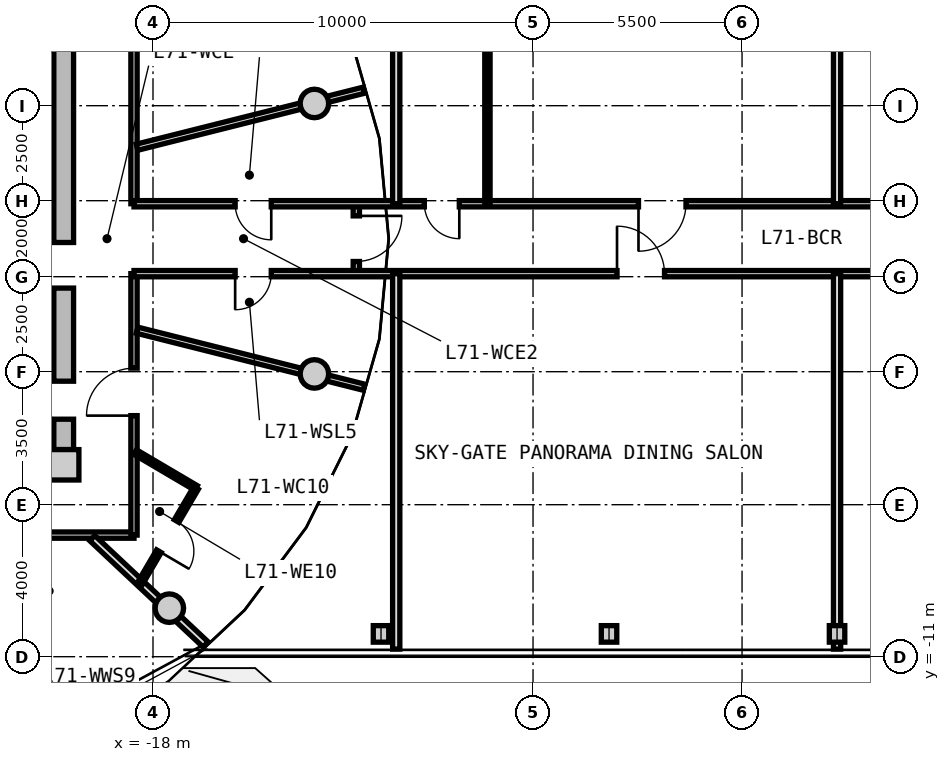
"""IFC4 building model, lengths in metres.
Left out: names, types, materials, properties, quantities, classifications, styles, units other than length and angle.
Written with IfcOpenShell. Run it as: python <this file> out.ifc"""

import sys

from ifc_helpers import new_model, si_unit, direction, frame, frame_2d, origin, origin_2d, place, context, subcontext, project, spatial, rectangle, circle, i_section, extrude, source, transform, mapped, element, fill, save


model = new_model("IFC4")
c1 = context("Model", 3, precision=1e-05, world=origin(), true_north=direction((0.0, 1.0)))
c2 = subcontext(c1, "Body", "Model", "MODEL_VIEW")
j1 = project(units=[si_unit("LENGTHUNIT", "METRE"), si_unit("PLANEANGLEUNIT", "RADIAN")], contexts=[c1])
p1 = place(None, origin())
s1 = spatial("IfcSite", under=j1, at=p1, CompositionType="ELEMENT")
p2 = place(p1, origin())
s2 = spatial("IfcBuilding", under=s1, at=p2, CompositionType="ELEMENT")
p3 = place(p2, frame((0.0, 0.0, 229.15)))
s3 = spatial("IfcBuildingStorey", under=s2, at=p3, CompositionType="ELEMENT", Elevation=229.15)
m1 = source(origin(), c2, "Body", "SweptSolid", [
    extrude(rectangle(XDim=0.8, YDim=0.8, at=origin_2d()), origin(), (0.0, 0.0, 1.0), 3.05),
])
p4 = place(p3, frame((-20.35, -5.95, 0.0), z_axis=(0.0, 0.0, 1.0), x_axis=(1.0, 0.0, 0.0)))
e1 = element("IfcColumn", 1, at=p4, inside=s3, PredefinedType="COLUMN", context=c2, shape_type="MappedRepresentation", body=[
    mapped(m1, transform((0.0, 0.0, 0.0), x_axis=(1.0, 0.0, 0.0), y_axis=(0.0, 1.0, 0.0), z_axis=(0.0, 0.0, 1.0), scale=1.0)),
])
m2 = source(origin(), c2, "Body", "SweptSolid", [
    extrude(rectangle(XDim=11.1, YDim=0.52, at=frame_2d((5.55, 0.0))), origin(), (0.0, 0.0, 1.0), 2.81),
])
p5 = place(p3, frame((-20.35, 5.55, 0.0), z_axis=(0.0, 0.0, 1.0), x_axis=(0.0, -1.0, 0.0)))
e2 = element("IfcWall", 2, at=p5, inside=s3, PredefinedType="SHEAR", context=c2, shape_type="MappedRepresentation", body=[
    mapped(m2, transform((0.0, 0.0, 0.0), x_axis=(1.0, 0.0, 0.0), y_axis=(0.0, 1.0, 0.0), z_axis=(0.0, 0.0, 1.0), scale=1.0)),
])
p6 = place(p5, frame((5.65, 0.0, 0.0)))
e3 = element("IfcOpeningElement", 3, at=p6, cuts=e2, PredefinedType="OPENING", context=c2, shape_type="SweptSolid", body=[
    extrude(rectangle(XDim=1.2, YDim=2.15, at=frame_2d((0.6, 1.075))), frame((0.0, 0.27, 0.0), z_axis=(0.0, -1.0, 0.0), x_axis=(1.0, 0.0, 0.0)), (0.0, 0.0, 1.0), 0.54),
])
p7 = place(p5, frame((9.3, 0.0, 0.0)))
e4 = element("IfcOpeningElement", 4, at=p7, cuts=e2, PredefinedType="OPENING", context=c2, shape_type="SweptSolid", body=[
    extrude(rectangle(XDim=1.0, YDim=2.1, at=frame_2d((0.5, 1.05))), frame((0.0, 0.27, 0.0), z_axis=(0.0, -1.0, 0.0), x_axis=(1.0, 0.0, 0.0)), (0.0, 0.0, 1.0), 0.54),
])
m3 = source(origin(), c2, "Body", "SweptSolid", [
    extrude(circle(Radius=0.375, at=origin_2d()), origin(), (0.0, 0.0, 1.0), 3.05),
])
for number, where, z_axis, x_axis in (
    (5, (-13.753, 3.559, 0.0), (0.0, 0.0, 1.0), (1.0, 0.0, 0.0)),
    (6, (-17.57, -9.723, 0.0), (0.0, 0.0, 1.0), (1.0, 0.0, 0.0)),
    (7, (-13.753, -3.559, 0.0), (0.0, 0.0, 1.0), (1.0, 0.0, 0.0)),
):
    element("IfcColumn", number, at=place(p3, frame(where, z_axis=z_axis, x_axis=x_axis)), inside=s3, PredefinedType="COLUMN", context=c2, shape_type="MappedRepresentation", body=[
        mapped(m3, transform((0.0, 0.0, 0.0), x_axis=(1.0, 0.0, 0.0), y_axis=(0.0, 1.0, 0.0), z_axis=(0.0, 0.0, 1.0), scale=1.0)),
    ])
m4 = source(origin(), c2, "Body", "SweptSolid", [
    extrude(i_section(OverallWidth=0.407, OverallDepth=0.435, WebThickness=0.024, FlangeThickness=0.039, FilletRadius=0.015, at=origin_2d()), origin(), (0.0, 0.0, 1.0), 3.05),
])
for number, where, z_axis, x_axis in (
    (8, (-12.0, -10.4, 0.0), (0.0, 0.0, 1.0), (1.0, 0.0, 0.0)),
    (9, (-6.0, -10.4, 0.0), (0.0, 0.0, 1.0), (1.0, 0.0, 0.0)),
    (10, (0.0, -10.4, 0.0), (0.0, 0.0, 1.0), (1.0, 0.0, 0.0)),
):
    element("IfcColumn", number, at=place(p3, frame(where, z_axis=z_axis, x_axis=x_axis)), inside=s3, PredefinedType="COLUMN", context=c2, shape_type="MappedRepresentation", body=[
        mapped(m4, transform((0.0, 0.0, 0.0), x_axis=(1.0, 0.0, 0.0), y_axis=(0.0, 1.0, 0.0), z_axis=(0.0, 0.0, 1.0), scale=1.0)),
    ])
m5 = source(origin(), c2, "Body", "SweptSolid", [
    extrude(rectangle(XDim=19.0, YDim=0.165, at=frame_2d((9.5, 0.0))), origin(), (0.0, 0.0, 1.0), 2.795),
])
p8 = place(p3, frame((-18.5, -7.8, 0.0), z_axis=(0.0, 0.0, 1.0), x_axis=(-1.0, 0.0, 0.0)))
e11 = element("IfcWall", 11, at=p8, inside=s3, PredefinedType="PARTITIONING", context=c2, shape_type="MappedRepresentation", body=[
    mapped(m5, transform((0.0, 0.0, 0.0), x_axis=(1.0, 0.0, 0.0), y_axis=(0.0, 1.0, 0.0), z_axis=(0.0, 0.0, 1.0), scale=1.0)),
])
p9 = place(p8, frame((12.373, 0.0, 0.0)))
e12 = element("IfcOpeningElement", 12, at=p9, cuts=e11, PredefinedType="OPENING", context=c2, shape_type="SweptSolid", body=[
    extrude(rectangle(XDim=1.25, YDim=2.2, at=frame_2d((0.625, 1.1))), frame((0.0, 0.093, 0.0), z_axis=(0.0, -1.0, 0.0), x_axis=(1.0, 0.0, 0.0)), (0.0, 0.0, 1.0), 0.185),
])
p10 = place(p8, frame((5.946, 0.0, 0.0)))
e13 = element("IfcOpeningElement", 13, at=p10, cuts=e11, PredefinedType="OPENING", context=c2, shape_type="SweptSolid", body=[
    extrude(rectangle(XDim=0.92, YDim=2.1, at=frame_2d((0.46, 1.05))), frame((0.0, 0.093, 0.0), z_axis=(0.0, -1.0, 0.0), x_axis=(1.0, 0.0, 0.0)), (0.0, 0.0, 1.0), 0.185),
])
p11 = place(p8, frame((2.83, 0.0, 0.0)))
e14 = element("IfcOpeningElement", 14, at=p11, cuts=e11, PredefinedType="OPENING", context=c2, shape_type="SweptSolid", body=[
    extrude(rectangle(XDim=0.92, YDim=2.1, at=frame_2d((0.46, 1.05))), frame((0.0, 0.093, 0.0), z_axis=(0.0, -1.0, 0.0), x_axis=(1.0, 0.0, 0.0)), (0.0, 0.0, 1.0), 0.185),
])
m6 = source(origin(), c2, "Body", "SweptSolid", [
    extrude(rectangle(XDim=6.88, YDim=0.165, at=frame_2d((3.44, 0.0))), origin(), (0.0, 0.0, 1.0), 2.795),
])
p12 = place(p3, frame((-18.5, 7.8, 0.0), z_axis=(0.0, 0.0, 1.0), x_axis=(0.0, -1.0, 0.0)))
e15 = element("IfcWall", 15, at=p12, inside=s3, PredefinedType="PARTITIONING", context=c2, shape_type="MappedRepresentation", body=[
    mapped(m6, transform((0.0, 0.0, 0.0), x_axis=(1.0, 0.0, 0.0), y_axis=(0.0, 1.0, 0.0), z_axis=(0.0, 0.0, 1.0), scale=1.0)),
])
p13 = place(p3, frame((-18.5, -0.92, 0.0), z_axis=(0.0, 0.0, 1.0), x_axis=(0.0, -1.0, 0.0)))
e16 = element("IfcWall", 16, at=p13, inside=s3, PredefinedType="PARTITIONING", context=c2, shape_type="MappedRepresentation", body=[
    mapped(m6, transform((0.0, 0.0, 0.0), x_axis=(1.0, 0.0, 0.0), y_axis=(0.0, 1.0, 0.0), z_axis=(0.0, 0.0, 1.0), scale=1.0)),
])
p14 = place(p13, frame((2.486, 0.0, 0.0)))
e17 = element("IfcOpeningElement", 17, at=p14, cuts=e16, PredefinedType="OPENING", context=c2, shape_type="SweptSolid", body=[
    extrude(rectangle(XDim=1.25, YDim=2.2, at=frame_2d((0.625, 1.1))), frame((0.0, 0.093, 0.0), z_axis=(0.0, -1.0, 0.0), x_axis=(1.0, 0.0, 0.0)), (0.0, 0.0, 1.0), 0.185),
])
m7 = source(origin(), c2, "Body", "SweptSolid", [
    extrude(rectangle(XDim=6.157, YDim=0.165, at=frame_2d((3.079, 0.0))), origin(), (0.0, 0.0, 1.0), 2.395),
])
for number, where, z_axis, x_axis in (
    (18, (-18.42, -2.407, 0.0), (0.0, 0.0, 1.0), (0.97, -0.244, 0.0)),
    (19, (-18.42, 2.407, 0.0), (0.0, 0.0, 1.0), (0.97, 0.244, 0.0)),
):
    element("IfcWall", number, at=place(p3, frame(where, z_axis=z_axis, x_axis=x_axis)), inside=s3, PredefinedType="PARTITIONING", context=c2, shape_type="MappedRepresentation", body=[
        mapped(m7, transform((0.0, 0.0, 0.0), x_axis=(1.0, 0.0, 0.0), y_axis=(0.0, 1.0, 0.0), z_axis=(0.0, 0.0, 1.0), scale=1.0)),
    ])
m8 = source(origin(), c2, "Body", "SweptSolid", [
    extrude(rectangle(XDim=4.089, YDim=0.19, at=frame_2d((2.044, 0.0))), origin(), (0.0, 0.0, 1.0), 2.395),
])
p15 = place(p3, frame((-19.598, -7.88, 0.0), z_axis=(0.0, 0.0, 1.0), x_axis=(0.729401273609, -0.684086092577, 0.0)))
e20 = element("IfcWall", 20, at=p15, inside=s3, PredefinedType="PARTITIONING", context=c2, shape_type="MappedRepresentation", body=[
    mapped(m8, transform((0.0, 0.0, 0.0), x_axis=(1.0, 0.0, 0.0), y_axis=(0.0, 1.0, 0.0), z_axis=(0.0, 0.0, 1.0), scale=1.0)),
])
m9 = source(origin(), c2, "Body", "SweptSolid", [
    extrude(rectangle(XDim=1.859, YDim=0.14, at=frame_2d((0.93, 0.0))), origin(), (0.0, 0.0, 1.0), 2.795),
])
p16 = place(p3, frame((-18.47, -5.615, 0.0), z_axis=(0.0, 0.0, 1.0), x_axis=(0.861555897139, -0.507662718845, 0.0)))
e21 = element("IfcWall", 21, at=p16, inside=s3, PredefinedType="PARTITIONING", context=c2, shape_type="MappedRepresentation", body=[
    mapped(m9, transform((0.0, 0.0, 0.0), x_axis=(1.0, 0.0, 0.0), y_axis=(0.0, 1.0, 0.0), z_axis=(0.0, 0.0, 1.0), scale=1.0)),
])
m10 = source(origin(), c2, "Body", "SweptSolid", [
    extrude(rectangle(XDim=2.939, YDim=0.14, at=frame_2d((1.47, 0.0))), origin(), (0.0, 0.0, 1.0), 2.795),
])
p17 = place(p3, frame((-16.868, -6.559, 0.0), z_axis=(0.0, 0.0, 1.0), x_axis=(-0.505883614636, -0.862601743821, 0.0)))
e22 = element("IfcWall", 22, at=p17, inside=s3, PredefinedType="PARTITIONING", context=c2, shape_type="MappedRepresentation", body=[
    mapped(m10, transform((0.0, 0.0, 0.0), x_axis=(1.0, 0.0, 0.0), y_axis=(0.0, 1.0, 0.0), z_axis=(0.0, 0.0, 1.0), scale=1.0)),
])
p18 = place(p17, frame((1.01, 0.0, 0.0)))
e23 = element("IfcOpeningElement", 23, at=p18, cuts=e22, PredefinedType="OPENING", context=c2, shape_type="SweptSolid", body=[
    extrude(rectangle(XDim=0.92, YDim=2.1, at=frame_2d((0.46, 1.05))), frame((0.0, 0.08, 0.0), z_axis=(0.0, -1.0, 0.0), x_axis=(1.0, 0.0, 0.0)), (0.0, 0.0, 1.0), 0.16),
])
m11 = source(origin(), c2, "Body", "SweptSolid", [
    extrude(rectangle(XDim=1.84, YDim=0.165, at=frame_2d((0.92, 0.0))), origin(), (0.0, 0.0, 1.0), 2.795),
])
p19 = place(p3, frame((-12.65, -0.92, 0.0), z_axis=(0.0, 0.0, 1.0), x_axis=(0.0, 1.0, 0.0)))
e24 = element("IfcWall", 24, at=p19, inside=s3, PredefinedType="PARTITIONING", context=c2, shape_type="MappedRepresentation", body=[
    mapped(m11, transform((0.0, 0.0, 0.0), x_axis=(1.0, 0.0, 0.0), y_axis=(0.0, 1.0, 0.0), z_axis=(0.0, 0.0, 1.0), scale=1.0)),
])
p20 = place(p19, frame((0.32, 0.0, 0.0)))
e25 = element("IfcOpeningElement", 25, at=p20, cuts=e24, PredefinedType="OPENING", context=c2, shape_type="SweptSolid", body=[
    extrude(rectangle(XDim=1.2, YDim=2.15, at=frame_2d((0.6, 1.075))), frame((0.0, 0.093, 0.0), z_axis=(0.0, -1.0, 0.0), x_axis=(1.0, 0.0, 0.0)), (0.0, 0.0, 1.0), 0.185),
])
m12 = source(origin(), c2, "Body", "SweptSolid", [
    extrude(rectangle(XDim=37.0, YDim=0.165, at=frame_2d((18.5, 0.0))), origin(), (0.0, 0.0, 1.0), 2.795),
])
p21 = place(p3, frame((-18.5, -0.92, 0.0), z_axis=(0.0, 0.0, 1.0), x_axis=(1.0, 0.0, 0.0)))
e26 = element("IfcWall", 26, at=p21, inside=s3, PredefinedType="PARTITIONING", context=c2, shape_type="MappedRepresentation", body=[
    mapped(m12, transform((0.0, 0.0, 0.0), x_axis=(1.0, 0.0, 0.0), y_axis=(0.0, 1.0, 0.0), z_axis=(0.0, 0.0, 1.0), scale=1.0)),
])
p22 = place(p21, frame((2.662, 0.0, 0.0)))
e27 = element("IfcOpeningElement", 27, at=p22, cuts=e26, PredefinedType="OPENING", context=c2, shape_type="SweptSolid", body=[
    extrude(rectangle(XDim=0.95, YDim=2.1, at=frame_2d((0.475, 1.05))), frame((0.0, 0.093, 0.0), z_axis=(0.0, -1.0, 0.0), x_axis=(1.0, 0.0, 0.0)), (0.0, 0.0, 1.0), 0.185),
])
p23 = place(p21, frame((33.388, 0.0, 0.0)))
e28 = element("IfcOpeningElement", 28, at=p23, cuts=e26, PredefinedType="OPENING", context=c2, shape_type="SweptSolid", body=[
    extrude(rectangle(XDim=0.95, YDim=2.1, at=frame_2d((0.475, 1.05))), frame((0.0, 0.093, 0.0), z_axis=(0.0, -1.0, 0.0), x_axis=(1.0, 0.0, 0.0)), (0.0, 0.0, 1.0), 0.185),
])
p24 = place(p21, frame((12.71, 0.0, 0.0)))
e29 = element("IfcOpeningElement", 29, at=p24, cuts=e26, PredefinedType="OPENING", context=c2, shape_type="SweptSolid", body=[
    extrude(rectangle(XDim=1.25, YDim=2.2, at=frame_2d((0.625, 1.1))), frame((0.0, 0.093, 0.0), z_axis=(0.0, -1.0, 0.0), x_axis=(1.0, 0.0, 0.0)), (0.0, 0.0, 1.0), 0.185),
])
p25 = place(p21, frame((20.875, 0.0, 0.0)))
e30 = element("IfcOpeningElement", 30, at=p25, cuts=e26, PredefinedType="OPENING", context=c2, shape_type="SweptSolid", body=[
    extrude(rectangle(XDim=1.25, YDim=2.2, at=frame_2d((0.625, 1.1))), frame((0.0, 0.093, 0.0), z_axis=(0.0, -1.0, 0.0), x_axis=(1.0, 0.0, 0.0)), (0.0, 0.0, 1.0), 0.185),
])
p26 = place(p21, frame((26.675, 0.0, 0.0)))
e31 = element("IfcOpeningElement", 31, at=p26, cuts=e26, PredefinedType="OPENING", context=c2, shape_type="SweptSolid", body=[
    extrude(rectangle(XDim=1.25, YDim=2.2, at=frame_2d((0.625, 1.1))), frame((0.0, 0.093, 0.0), z_axis=(0.0, -1.0, 0.0), x_axis=(1.0, 0.0, 0.0)), (0.0, 0.0, 1.0), 0.185),
])
p27 = place(p3, frame((-18.5, 0.92, 0.0), z_axis=(0.0, 0.0, 1.0), x_axis=(1.0, 0.0, 0.0)))
e32 = element("IfcWall", 32, at=p27, inside=s3, PredefinedType="PARTITIONING", context=c2, shape_type="MappedRepresentation", body=[
    mapped(m12, transform((0.0, 0.0, 0.0), x_axis=(1.0, 0.0, 0.0), y_axis=(0.0, 1.0, 0.0), z_axis=(0.0, 0.0, 1.0), scale=1.0)),
])
p28 = place(p27, frame((2.662, 0.0, 0.0)))
e33 = element("IfcOpeningElement", 33, at=p28, cuts=e32, PredefinedType="OPENING", context=c2, shape_type="SweptSolid", body=[
    extrude(rectangle(XDim=0.95, YDim=2.1, at=frame_2d((0.475, 1.05))), frame((0.0, 0.093, 0.0), z_axis=(0.0, -1.0, 0.0), x_axis=(1.0, 0.0, 0.0)), (0.0, 0.0, 1.0), 0.185),
])
p29 = place(p27, frame((33.388, 0.0, 0.0)))
e34 = element("IfcOpeningElement", 34, at=p29, cuts=e32, PredefinedType="OPENING", context=c2, shape_type="SweptSolid", body=[
    extrude(rectangle(XDim=0.95, YDim=2.1, at=frame_2d((0.475, 1.05))), frame((0.0, 0.093, 0.0), z_axis=(0.0, -1.0, 0.0), x_axis=(1.0, 0.0, 0.0)), (0.0, 0.0, 1.0), 0.185),
])
p30 = place(p27, frame((7.64, 0.0, 0.0)))
e35 = element("IfcOpeningElement", 35, at=p30, cuts=e32, PredefinedType="OPENING", context=c2, shape_type="SweptSolid", body=[
    extrude(rectangle(XDim=0.92, YDim=2.1, at=frame_2d((0.46, 1.05))), frame((0.0, 0.093, 0.0), z_axis=(0.0, -1.0, 0.0), x_axis=(1.0, 0.0, 0.0)), (0.0, 0.0, 1.0), 0.185),
])
p31 = place(p27, frame((13.275, 0.0, 0.0)))
e36 = element("IfcOpeningElement", 36, at=p31, cuts=e32, PredefinedType="OPENING", context=c2, shape_type="SweptSolid", body=[
    extrude(rectangle(XDim=1.25, YDim=2.2, at=frame_2d((0.625, 1.1))), frame((0.0, 0.093, 0.0), z_axis=(0.0, -1.0, 0.0), x_axis=(1.0, 0.0, 0.0)), (0.0, 0.0, 1.0), 0.185),
])
p32 = place(p27, frame((20.875, 0.0, 0.0)))
e37 = element("IfcOpeningElement", 37, at=p32, cuts=e32, PredefinedType="OPENING", context=c2, shape_type="SweptSolid", body=[
    extrude(rectangle(XDim=1.25, YDim=2.2, at=frame_2d((0.625, 1.1))), frame((0.0, 0.093, 0.0), z_axis=(0.0, -1.0, 0.0), x_axis=(1.0, 0.0, 0.0)), (0.0, 0.0, 1.0), 0.185),
])
p33 = place(p27, frame((26.675, 0.0, 0.0)))
e38 = element("IfcOpeningElement", 38, at=p33, cuts=e32, PredefinedType="OPENING", context=c2, shape_type="SweptSolid", body=[
    extrude(rectangle(XDim=1.25, YDim=2.2, at=frame_2d((0.625, 1.1))), frame((0.0, 0.093, 0.0), z_axis=(0.0, -1.0, 0.0), x_axis=(1.0, 0.0, 0.0)), (0.0, 0.0, 1.0), 0.185),
])
m13 = source(origin(), c2, "Body", "SweptSolid", [
    extrude(rectangle(XDim=9.88, YDim=0.19, at=frame_2d((4.94, 0.0))), origin(), (0.0, 0.0, 1.0), 2.795),
])
for number, where, z_axis, x_axis in (
    (39, (-11.6, -10.8, 0.0), (0.0, 0.0, 1.0), (0.0, 1.0, 0.0)),
    (40, (-11.6, 0.92, 0.0), (0.0, 0.0, 1.0), (0.0, 1.0, 0.0)),
):
    element("IfcWall", number, at=place(p3, frame(where, z_axis=z_axis, x_axis=x_axis)), inside=s3, PredefinedType="PARTITIONING", context=c2, shape_type="MappedRepresentation", body=[
        mapped(m13, transform((0.0, 0.0, 0.0), x_axis=(1.0, 0.0, 0.0), y_axis=(0.0, 1.0, 0.0), z_axis=(0.0, 0.0, 1.0), scale=1.0)),
    ])
m14 = source(origin(), c2, "Body", "SweptSolid", [
    extrude(rectangle(XDim=9.88, YDim=0.19, at=frame_2d((4.94, 0.0))), origin(), (0.0, 0.0, 1.0), 2.095),
])
for number, where, z_axis, x_axis in (
    (41, (0.0, -10.8, 0.0), (0.0, 0.0, 1.0), (0.0, 1.0, 0.0)),
    (42, (0.0, 0.92, 0.0), (0.0, 0.0, 1.0), (0.0, 1.0, 0.0)),
):
    element("IfcWall", number, at=place(p3, frame(where, z_axis=z_axis, x_axis=x_axis)), inside=s3, PredefinedType="PARTITIONING", context=c2, shape_type="MappedRepresentation", body=[
        mapped(m14, transform((0.0, 0.0, 0.0), x_axis=(1.0, 0.0, 0.0), y_axis=(0.0, 1.0, 0.0), z_axis=(0.0, 0.0, 1.0), scale=1.0)),
    ])
m15 = source(origin(), c2, "Body", "SweptSolid", [
    extrude(rectangle(XDim=9.88, YDim=0.14, at=frame_2d((4.94, 0.0))), origin(), (0.0, 0.0, 1.0), 2.795),
])
p34 = place(p3, frame((-9.2, 0.92, 0.0), z_axis=(0.0, 0.0, 1.0), x_axis=(0.0, 1.0, 0.0)))
e43 = element("IfcWall", 43, at=p34, inside=s3, PredefinedType="PARTITIONING", context=c2, shape_type="MappedRepresentation", body=[
    mapped(m15, transform((0.0, 0.0, 0.0), x_axis=(1.0, 0.0, 0.0), y_axis=(0.0, 1.0, 0.0), z_axis=(0.0, 0.0, 1.0), scale=1.0)),
])
m16 = source(origin(), c2, "Body", "SweptSolid", [
    extrude(rectangle(XDim=1.2, YDim=2.15, at=frame_2d((0.6, 1.075))), frame((0.0, 0.025, 0.0), z_axis=(0.0, -1.0, 0.0), x_axis=(1.0, 0.0, 0.0)), (0.0, 0.0, 1.0), 0.05),
])
p35 = place(p6, frame((1.2, 0.0, 0.0), z_axis=(0.0, 0.0, 1.0), x_axis=(-1.0, 0.0, 0.0)))
e44 = element("IfcDoor", 44, at=p35, inside=s3, OperationType="SINGLE_SWING_RIGHT", PredefinedType="DOOR", context=c2, shape_type="MappedRepresentation", body=[
    mapped(m16, transform((0.0, 0.0, 0.0), x_axis=(1.0, 0.0, 0.0), y_axis=(0.0, 1.0, 0.0), z_axis=(0.0, 0.0, 1.0), scale=1.0)),
])
fill(e3, e44)
m17 = source(origin(), c2, "Body", "SweptSolid", [
    extrude(rectangle(XDim=1.0, YDim=2.1, at=frame_2d((0.5, 1.05))), frame((0.0, 0.025, 0.0), z_axis=(0.0, -1.0, 0.0), x_axis=(1.0, 0.0, 0.0)), (0.0, 0.0, 1.0), 0.05),
])
p36 = place(p7, frame((1.0, 0.0, 0.0), z_axis=(0.0, 0.0, 1.0), x_axis=(-1.0, 0.0, 0.0)))
e45 = element("IfcDoor", 45, at=p36, inside=s3, OperationType="SINGLE_SWING_RIGHT", PredefinedType="DOOR", context=c2, shape_type="MappedRepresentation", body=[
    mapped(m17, transform((0.0, 0.0, 0.0), x_axis=(1.0, 0.0, 0.0), y_axis=(0.0, 1.0, 0.0), z_axis=(0.0, 0.0, 1.0), scale=1.0)),
])
fill(e4, e45)
m18 = source(origin(), c2, "Body", "SweptSolid", [
    extrude(rectangle(XDim=0.95, YDim=2.1, at=frame_2d((0.475, 1.05))), frame((0.0, 0.025, 0.0), z_axis=(0.0, -1.0, 0.0), x_axis=(1.0, 0.0, 0.0)), (0.0, 0.0, 1.0), 0.05),
])
p37 = place(p22, frame((0.95, 0.0, 0.0), z_axis=(0.0, 0.0, 1.0), x_axis=(-1.0, 0.0, 0.0)))
e46 = element("IfcDoor", 46, at=p37, inside=s3, OperationType="SINGLE_SWING_RIGHT", PredefinedType="DOOR", context=c2, shape_type="MappedRepresentation", body=[
    mapped(m18, transform((0.0, 0.0, 0.0), x_axis=(1.0, 0.0, 0.0), y_axis=(0.0, 1.0, 0.0), z_axis=(0.0, 0.0, 1.0), scale=1.0)),
])
fill(e27, e46)
p38 = place(p28, frame((0.95, 0.0, 0.0), z_axis=(0.0, 0.0, 1.0), x_axis=(-1.0, 0.0, 0.0)))
e47 = element("IfcDoor", 47, at=p38, inside=s3, OperationType="SINGLE_SWING_LEFT", PredefinedType="DOOR", context=c2, shape_type="MappedRepresentation", body=[
    mapped(m18, transform((0.0, 0.0, 0.0), x_axis=(1.0, 0.0, 0.0), y_axis=(0.0, 1.0, 0.0), z_axis=(0.0, 0.0, 1.0), scale=1.0)),
])
fill(e33, e47)
m19 = source(origin(), c2, "Body", "SweptSolid", [
    extrude(rectangle(XDim=1.25, YDim=2.2, at=frame_2d((0.625, 1.1))), frame((0.0, 0.025, 0.0), z_axis=(0.0, -1.0, 0.0), x_axis=(1.0, 0.0, 0.0)), (0.0, 0.0, 1.0), 0.05),
])
p39 = place(p14, frame((1.25, 0.0, 0.0), z_axis=(0.0, 0.0, 1.0), x_axis=(-1.0, 0.0, 0.0)))
e48 = element("IfcDoor", 48, at=p39, inside=s3, OperationType="SINGLE_SWING_LEFT", PredefinedType="DOOR", context=c2, shape_type="MappedRepresentation", body=[
    mapped(m19, transform((0.0, 0.0, 0.0), x_axis=(1.0, 0.0, 0.0), y_axis=(0.0, 1.0, 0.0), z_axis=(0.0, 0.0, 1.0), scale=1.0)),
])
fill(e17, e48)
m20 = source(origin(), c2, "Body", "SweptSolid", [
    extrude(rectangle(XDim=0.92, YDim=2.1, at=frame_2d((0.46, 1.05))), frame((0.0, 0.025, 0.0), z_axis=(0.0, -1.0, 0.0), x_axis=(1.0, 0.0, 0.0)), (0.0, 0.0, 1.0), 0.05),
])
p40 = place(p18, origin())
e49 = element("IfcDoor", 49, at=p40, inside=s3, OperationType="SINGLE_SWING_RIGHT", PredefinedType="DOOR", context=c2, shape_type="MappedRepresentation", body=[
    mapped(m20, transform((0.0, 0.0, 0.0), x_axis=(1.0, 0.0, 0.0), y_axis=(0.0, 1.0, 0.0), z_axis=(0.0, 0.0, 1.0), scale=1.0)),
])
fill(e23, e49)
p41 = place(p20, frame((1.2, 0.0, 0.0), z_axis=(0.0, 0.0, 1.0), x_axis=(-1.0, 0.0, 0.0)))
e50 = element("IfcDoor", 50, at=p41, inside=s3, OperationType="SINGLE_SWING_LEFT", PredefinedType="DOOR", context=c2, shape_type="MappedRepresentation", body=[
    mapped(m16, transform((0.0, 0.0, 0.0), x_axis=(1.0, 0.0, 0.0), y_axis=(0.0, 1.0, 0.0), z_axis=(0.0, 0.0, 1.0), scale=1.0)),
])
fill(e25, e50)
p42 = place(p24, origin())
e51 = element("IfcDoor", 51, at=p42, inside=s3, OperationType="SINGLE_SWING_LEFT", PredefinedType="DOOR", context=c2, shape_type="MappedRepresentation", body=[
    mapped(m19, transform((0.0, 0.0, 0.0), x_axis=(1.0, 0.0, 0.0), y_axis=(0.0, 1.0, 0.0), z_axis=(0.0, 0.0, 1.0), scale=1.0)),
])
fill(e29, e51)
p43 = place(p30, frame((0.92, 0.0, 0.0), z_axis=(0.0, 0.0, 1.0), x_axis=(-1.0, 0.0, 0.0)))
e52 = element("IfcDoor", 52, at=p43, inside=s3, OperationType="SINGLE_SWING_LEFT", PredefinedType="DOOR", context=c2, shape_type="MappedRepresentation", body=[
    mapped(m20, transform((0.0, 0.0, 0.0), x_axis=(1.0, 0.0, 0.0), y_axis=(0.0, 1.0, 0.0), z_axis=(0.0, 0.0, 1.0), scale=1.0)),
])
fill(e35, e52)
p44 = place(p31, frame((1.25, 0.0, 0.0), z_axis=(0.0, 0.0, 1.0), x_axis=(-1.0, 0.0, 0.0)))
e53 = element("IfcDoor", 53, at=p44, inside=s3, OperationType="SINGLE_SWING_RIGHT", PredefinedType="DOOR", context=c2, shape_type="MappedRepresentation", body=[
    mapped(m19, transform((0.0, 0.0, 0.0), x_axis=(1.0, 0.0, 0.0), y_axis=(0.0, 1.0, 0.0), z_axis=(0.0, 0.0, 1.0), scale=1.0)),
])
fill(e36, e53)
save(model, sys.argv[1])
